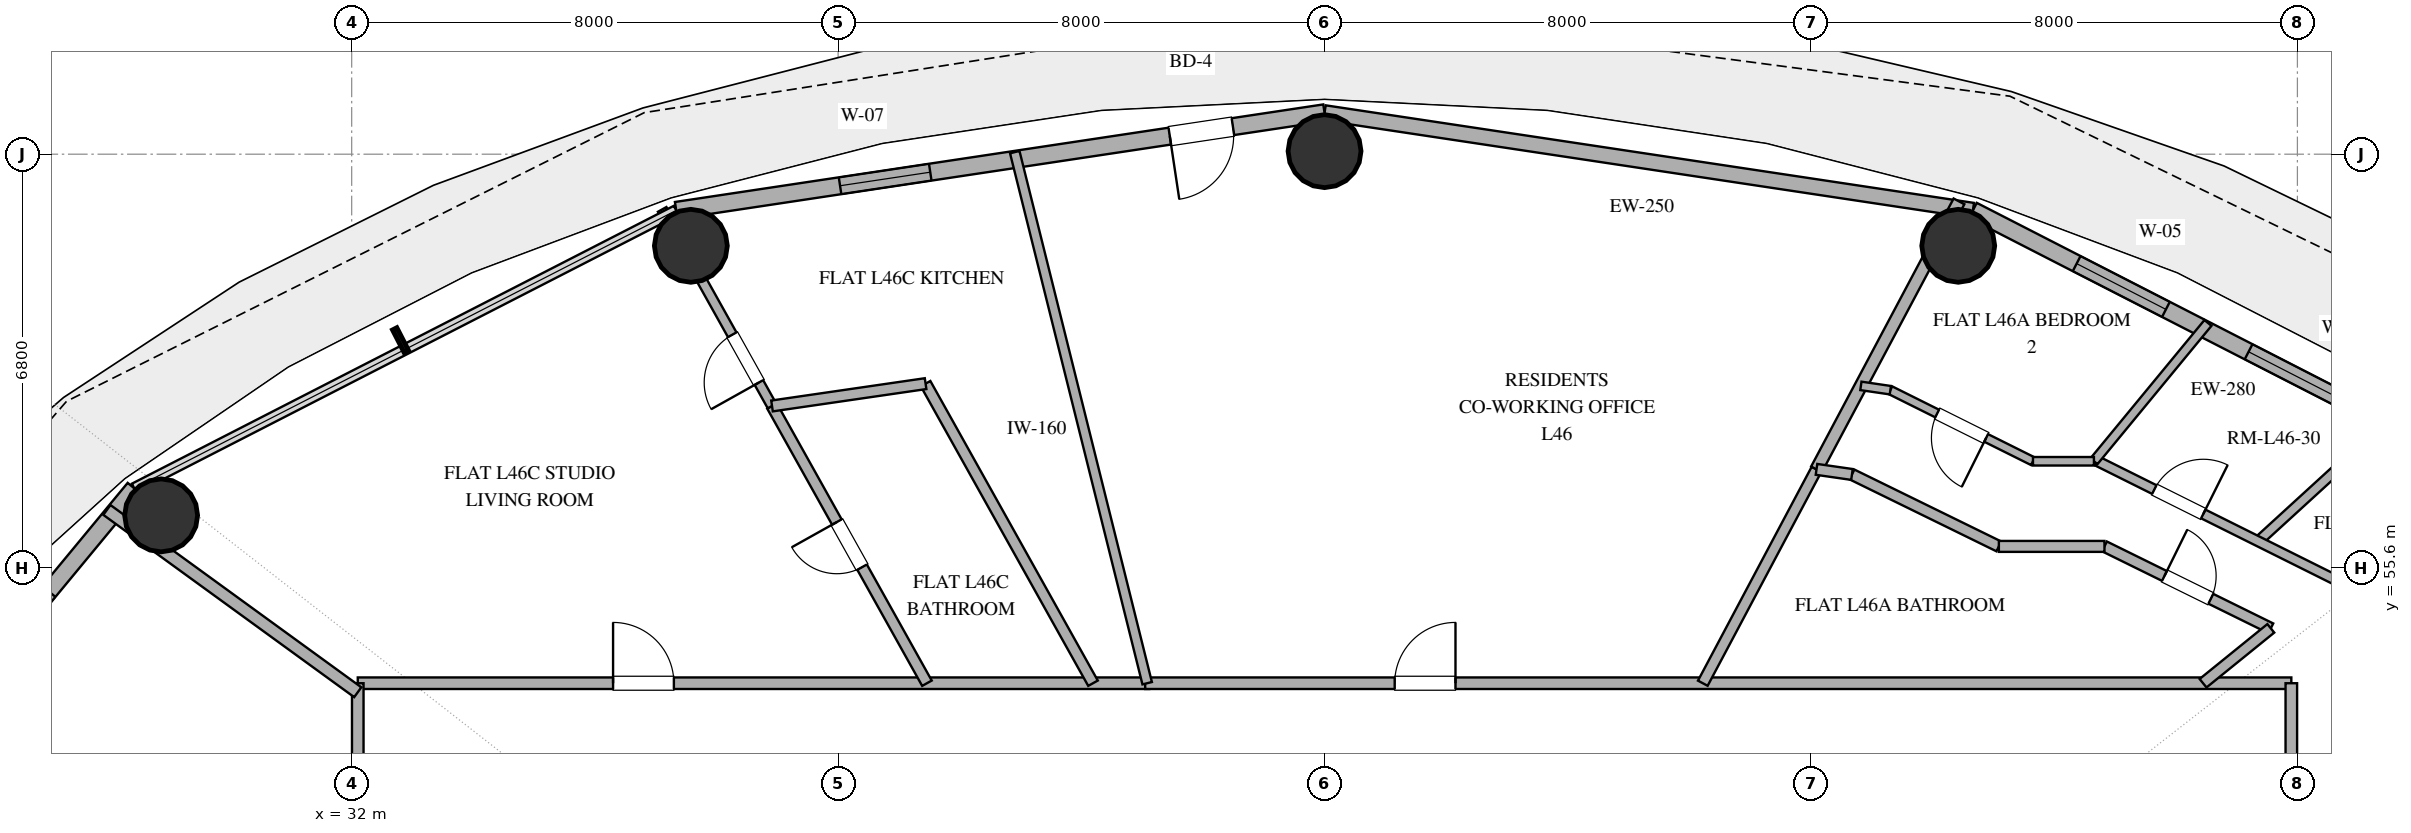
"""IFC4 building model, lengths in metres.
Left out: names, types, materials, properties, quantities, classifications, styles, units other than length and angle.
Written with IfcOpenShell. Run it as: python <this file> out.ifc"""

import sys

from ifc_helpers import new_model, si_unit, direction, frame, frame_2d, origin, origin_2d, place, context, subcontext, project, spatial, rectangle, hollow_circle, extrude, element, fill, save


model = new_model("IFC4")
c1 = context("Model", 3, precision=1e-05, world=origin(), true_north=direction((0.0, 1.0)))
c2 = subcontext(c1, "Body", "Model", "MODEL_VIEW")
j1 = project(units=[si_unit("LENGTHUNIT", "METRE"), si_unit("PLANEANGLEUNIT", "RADIAN")], contexts=[c1])
p1 = place(None, origin())
s1 = spatial("IfcSite", under=j1, at=p1, CompositionType="ELEMENT")
p2 = place(p1, origin())
s2 = spatial("IfcBuilding", under=s1, at=p2, CompositionType="ELEMENT")
p3 = place(p2, frame((0.0, 0.0, 183.0)))
s3 = spatial("IfcBuildingStorey", under=s2, at=p3, CompositionType="ELEMENT", Elevation=183.0)
for number, where, z_axis, x_axis in (
    (1, (58.422, 60.893, 0.0), (0.0, 0.0, 1.0), (1.0, 0.0, 0.0)),
    (2, (48.0, 62.45, 0.0), (0.0, 0.0, 1.0), (1.0, 0.0, 0.0)),
    (3, (37.578, 60.893, 0.0), (0.0, 0.0, 1.0), (1.0, 0.0, 0.0)),
    (4, (28.866, 56.46, 0.0), (0.0, 0.0, 1.0), (1.0, 0.0, 0.0)),
):
    element("IfcColumn", number, at=place(p3, frame(where, z_axis=z_axis, x_axis=x_axis)), inside=s3, PredefinedType="COLUMN", context=c2, shape_type="SweptSolid", body=[
        extrude(hollow_circle(Radius=0.6, WallThickness=0.032, at=origin_2d()), origin(), (0.0, 0.0, 1.0), 3.38),
    ])
p4 = place(p3, frame((67.576, 56.906, 0.0), z_axis=(0.0, 0.0, 1.0), x_axis=(-0.889872523182, 0.456209263919, 0.0)))
e5 = element("IfcWall", 5, at=p4, inside=s3, PredefinedType="SOLIDWALL", context=c2, shape_type="SweptSolid", body=[
    extrude(rectangle(XDim=10.016, YDim=0.28, at=frame_2d((5.008, 0.0))), origin(), (0.0, 0.0, 1.0), 3.38),
])
p5 = place(p4, frame((3.121, 0.0, 0.85)))
e6 = element("IfcOpeningElement", 6, at=p5, cuts=e5, PredefinedType="OPENING", context=c2, shape_type="SweptSolid", body=[
    extrude(rectangle(XDim=1.8, YDim=2.2, at=frame_2d((0.9, 1.1))), frame((0.0, 0.15, 0.0), z_axis=(0.0, -1.0, 0.0), x_axis=(1.0, 0.0, 0.0)), (0.0, 0.0, 1.0), 0.3),
])
p6 = place(p4, frame((6.448, 0.0, 0.85)))
e7 = element("IfcOpeningElement", 7, at=p6, cuts=e5, PredefinedType="OPENING", context=c2, shape_type="SweptSolid", body=[
    extrude(rectangle(XDim=1.65, YDim=2.0, at=frame_2d((0.825, 1.0))), frame((0.0, 0.15, 0.0), z_axis=(0.0, -1.0, 0.0), x_axis=(1.0, 0.0, 0.0)), (0.0, 0.0, 1.0), 0.3),
])
p7 = place(p3, frame((58.663, 61.475, 0.0), z_axis=(0.0, 0.0, 1.0), x_axis=(-0.988863993413, 0.148822049884, 0.0)))
e8 = element("IfcWall", 8, at=p7, inside=s3, PredefinedType="SOLIDWALL", context=c2, shape_type="SweptSolid", body=[
    extrude(rectangle(XDim=10.783, YDim=0.25, at=frame_2d((5.392, 0.0))), origin(), (0.0, 0.0, 1.0), 3.38),
])
p8 = place(p3, frame((48.0, 63.08, 0.0), z_axis=(0.0, 0.0, 1.0), x_axis=(-0.988863993413, -0.148822049884, 0.0)))
e9 = element("IfcWall", 9, at=p8, inside=s3, PredefinedType="SOLIDWALL", context=c2, shape_type="SweptSolid", body=[
    extrude(rectangle(XDim=10.783, YDim=0.28, at=frame_2d((5.392, 0.0))), origin(), (0.0, 0.0, 1.0), 3.38),
])
p9 = place(p8, frame((1.524, 0.0, 0.0)))
e10 = element("IfcOpeningElement", 10, at=p9, cuts=e9, PredefinedType="OPENING", context=c2, shape_type="SweptSolid", body=[
    extrude(rectangle(XDim=1.05, YDim=2.2, at=frame_2d((0.525, 1.1))), frame((0.0, 0.15, 0.0), z_axis=(0.0, -1.0, 0.0), x_axis=(1.0, 0.0, 0.0)), (0.0, 0.0, 1.0), 0.3),
])
p10 = place(p8, frame((6.558, 0.0, 0.85)))
e11 = element("IfcOpeningElement", 11, at=p10, cuts=e9, PredefinedType="OPENING", context=c2, shape_type="SweptSolid", body=[
    extrude(rectangle(XDim=1.5, YDim=1.8, at=frame_2d((0.75, 0.9))), frame((0.0, 0.15, 0.0), z_axis=(0.0, -1.0, 0.0), x_axis=(1.0, 0.0, 0.0)), (0.0, 0.0, 1.0), 0.3),
])
p11 = place(p3, frame((28.424, 56.906, 0.0), z_axis=(0.0, 0.0, 1.0), x_axis=(-0.637333477683, -0.770588111915, 0.0)))
e12 = element("IfcWall", 12, at=p11, inside=s3, PredefinedType="SOLIDWALL", context=c2, shape_type="SweptSolid", body=[
    extrude(rectangle(XDim=8.875, YDim=0.28, at=frame_2d((4.438, 0.0))), origin(), (0.0, 0.0, 1.0), 3.38),
])
p12 = place(p11, frame((2.202, 0.0, 0.85)))
e13 = element("IfcOpeningElement", 13, at=p12, cuts=e12, PredefinedType="OPENING", context=c2, shape_type="SweptSolid", body=[
    extrude(rectangle(XDim=1.35, YDim=1.8, at=frame_2d((0.675, 0.9))), frame((0.0, 0.15, 0.0), z_axis=(0.0, -1.0, 0.0), x_axis=(1.0, 0.0, 0.0)), (0.0, 0.0, 1.0), 0.3),
])
p13 = place(p11, frame((4.294, 0.0, 0.85)))
e14 = element("IfcOpeningElement", 14, at=p13, cuts=e12, PredefinedType="OPENING", context=c2, shape_type="SweptSolid", body=[
    extrude(rectangle(XDim=1.35, YDim=1.8, at=frame_2d((0.675, 0.9))), frame((0.0, 0.15, 0.0), z_axis=(0.0, -1.0, 0.0), x_axis=(1.0, 0.0, 0.0)), (0.0, 0.0, 1.0), 0.3),
])
p14 = place(p3, frame((32.1, 53.7, 0.0), z_axis=(0.0, 0.0, 1.0), x_axis=(1.0, 0.0, 0.0)))
e15 = element("IfcWall", 15, at=p14, inside=s3, PredefinedType="PARTITIONING", context=c2, shape_type="SweptSolid", body=[
    extrude(rectangle(XDim=13.016, YDim=0.19, at=frame_2d((6.508, 0.0))), origin(), (0.0, 0.0, 1.0), 2.74),
])
p15 = place(p14, frame((4.199, 0.0, 0.0)))
e16 = element("IfcOpeningElement", 16, at=p15, cuts=e15, PredefinedType="OPENING", context=c2, shape_type="SweptSolid", body=[
    extrude(rectangle(XDim=1.0, YDim=2.2, at=frame_2d((0.5, 1.1))), frame((0.0, 0.105, 0.0), z_axis=(0.0, -1.0, 0.0), x_axis=(1.0, 0.0, 0.0)), (0.0, 0.0, 1.0), 0.21),
])
p16 = place(p3, frame((45.05, 53.7, 0.0), z_axis=(0.0, 0.0, 1.0), x_axis=(1.0, 0.0, 0.0)))
e17 = element("IfcWall", 17, at=p16, inside=s3, PredefinedType="PARTITIONING", context=c2, shape_type="SweptSolid", body=[
    extrude(rectangle(XDim=18.85, YDim=0.19, at=frame_2d((9.425, 0.0))), origin(), (0.0, 0.0, 1.0), 2.74),
])
p17 = place(p16, frame((4.104, 0.0, 0.0)))
e18 = element("IfcOpeningElement", 18, at=p17, cuts=e17, PredefinedType="OPENING", context=c2, shape_type="SweptSolid", body=[
    extrude(rectangle(XDim=1.0, YDim=2.2, at=frame_2d((0.5, 1.1))), frame((0.0, 0.105, 0.0), z_axis=(0.0, -1.0, 0.0), x_axis=(1.0, 0.0, 0.0)), (0.0, 0.0, 1.0), 0.21),
])
p18 = place(p3, frame((45.083, 53.7, 0.0), z_axis=(0.0, 0.0, 1.0), x_axis=(-0.241929318505, 0.970293875508, 0.0)))
e19 = element("IfcWall", 19, at=p18, inside=s3, PredefinedType="PLUMBINGWALL", context=c2, shape_type="SweptSolid", body=[
    extrude(rectangle(XDim=9.001, YDim=0.16, at=frame_2d((4.501, 0.0))), origin(), (0.0, 0.0, 1.0), 2.74),
])
p19 = place(p3, frame((32.1, 42.765, 0.0), z_axis=(0.0, 0.0, 1.0), x_axis=(0.0, 1.0, 0.0)))
e20 = element("IfcWall", 20, at=p19, inside=s3, PredefinedType="PARTITIONING", context=c2, shape_type="SweptSolid", body=[
    extrude(rectangle(XDim=10.935, YDim=0.19, at=frame_2d((5.467, 0.0))), origin(), (0.0, 0.0, 1.0), 2.74),
])
p20 = place(p19, frame((6.06, 0.0, 0.0)))
e21 = element("IfcOpeningElement", 21, at=p20, cuts=e20, PredefinedType="OPENING", context=c2, shape_type="SweptSolid", body=[
    extrude(rectangle(XDim=1.0, YDim=2.2, at=frame_2d((0.5, 1.1))), frame((0.0, 0.105, 0.0), z_axis=(0.0, -1.0, 0.0), x_axis=(1.0, 0.0, 0.0)), (0.0, 0.0, 1.0), 0.21),
])
p21 = place(p3, frame((63.9, 53.7, 0.0), z_axis=(0.0, 0.0, 1.0), x_axis=(0.0, -1.0, 0.0)))
e22 = element("IfcWall", 22, at=p21, inside=s3, PredefinedType="PARTITIONING", context=c2, shape_type="SweptSolid", body=[
    extrude(rectangle(XDim=16.292, YDim=0.19, at=frame_2d((8.146, 0.0))), origin(), (0.0, 0.0, 1.0), 2.74),
])
p22 = place(p21, frame((3.087, 0.0, 0.0)))
e23 = element("IfcOpeningElement", 23, at=p22, cuts=e22, PredefinedType="OPENING", context=c2, shape_type="SweptSolid", body=[
    extrude(rectangle(XDim=1.0, YDim=2.2, at=frame_2d((0.5, 1.1))), frame((0.0, 0.105, 0.0), z_axis=(0.0, -1.0, 0.0), x_axis=(1.0, 0.0, 0.0)), (0.0, 0.0, 1.0), 0.21),
])
p23 = place(p3, frame((41.439, 58.627, 0.0), z_axis=(0.0, 0.0, 1.0), x_axis=(0.487819418615, -0.872944565721, 0.0)))
e24 = element("IfcWall", 24, at=p23, inside=s3, PredefinedType="PLUMBINGWALL", context=c2, shape_type="SweptSolid", body=[
    extrude(rectangle(XDim=5.644, YDim=0.18, at=frame_2d((2.822, 0.0))), origin(), (0.0, 0.0, 1.0), 2.74),
])
p24 = place(p3, frame((41.461, 53.7, 0.0), z_axis=(0.0, 0.0, 1.0), x_axis=(-0.487871640049, 0.872915381257, 0.0)))
e25 = element("IfcWall", 25, at=p24, inside=s3, PredefinedType="PLUMBINGWALL", context=c2, shape_type="SweptSolid", body=[
    extrude(rectangle(XDim=5.223, YDim=0.18, at=frame_2d((2.612, 0.0))), origin(), (0.0, 0.0, 1.0), 2.74),
])
p25 = place(p24, frame((2.187, 0.0, 0.0)))
e26 = element("IfcOpeningElement", 26, at=p25, cuts=e25, PredefinedType="OPENING", context=c2, shape_type="SweptSolid", body=[
    extrude(rectangle(XDim=0.85, YDim=2.1, at=frame_2d((0.425, 1.05))), frame((0.0, 0.1, 0.0), z_axis=(0.0, -1.0, 0.0), x_axis=(1.0, 0.0, 0.0)), (0.0, 0.0, 1.0), 0.2),
])
p26 = place(p3, frame((32.1, 53.552, 0.0), z_axis=(0.0, 0.0, 1.0), x_axis=(-0.809023715391, 0.587776001496, 0.0)))
e27 = element("IfcWall", 27, at=p26, inside=s3, PredefinedType="PARTITIONING", context=c2, shape_type="SweptSolid", body=[
    extrude(rectangle(XDim=5.1, YDim=0.2, at=frame_2d((2.55, 0.0))), origin(), (0.0, 0.0, 1.0), 2.74),
])
p27 = place(p3, frame((54.221, 53.7, 0.0), z_axis=(0.0, 0.0, 1.0), x_axis=(0.469480828888, 0.882942665922, 0.0)))
e28 = element("IfcWall", 28, at=p27, inside=s3, PredefinedType="PLUMBINGWALL", context=c2, shape_type="SweptSolid", body=[
    extrude(rectangle(XDim=3.983, YDim=0.18, at=frame_2d((1.992, 0.0))), origin(), (0.0, 0.0, 1.0), 2.74),
])
p28 = place(p3, frame((38.913, 58.26, 0.0), z_axis=(0.0, 0.0, 1.0), x_axis=(-0.487830223896, 0.87293852742, 0.0)))
e29 = element("IfcWall", 29, at=p28, inside=s3, PredefinedType="PLUMBINGWALL", context=c2, shape_type="SweptSolid", body=[
    extrude(rectangle(XDim=3.703, YDim=0.16, at=frame_2d((1.852, 0.0))), origin(), (0.0, 0.0, 1.0), 2.74),
])
p29 = place(p28, frame((0.441, 0.0, 0.0)))
e30 = element("IfcOpeningElement", 30, at=p29, cuts=e29, PredefinedType="OPENING", context=c2, shape_type="SweptSolid", body=[
    extrude(rectangle(XDim=0.9, YDim=2.1, at=frame_2d((0.45, 1.05))), frame((0.0, 0.09, 0.0), z_axis=(0.0, -1.0, 0.0), x_axis=(1.0, 0.0, 0.0)), (0.0, 0.0, 1.0), 0.18),
])
p30 = place(p3, frame((56.091, 57.217, 0.0), z_axis=(0.0, 0.0, 1.0), x_axis=(0.469455598571, 0.882956080997, 0.0)))
e31 = element("IfcWall", 31, at=p30, inside=s3, PredefinedType="PARTITIONING", context=c2, shape_type="SweptSolid", body=[
    extrude(rectangle(XDim=4.991, YDim=0.2, at=frame_2d((2.496, 0.0))), origin(), (0.0, 0.0, 1.0), 2.74),
])
p31 = place(p3, frame((60.827, 55.95, 0.0), z_axis=(0.0, 0.0, 1.0), x_axis=(0.897069141595, -0.441890207175, 0.0)))
e32 = element("IfcWall", 32, at=p31, inside=s3, PredefinedType="PLUMBINGWALL", context=c2, shape_type="SweptSolid", body=[
    extrude(rectangle(XDim=3.05, YDim=0.18, at=frame_2d((1.525, 0.0))), origin(), (0.0, 0.0, 1.0), 2.74),
])
p32 = place(p31, frame((1.1, 0.0, 0.0)))
e33 = element("IfcOpeningElement", 33, at=p32, cuts=e32, PredefinedType="OPENING", context=c2, shape_type="SweptSolid", body=[
    extrude(rectangle(XDim=0.85, YDim=2.1, at=frame_2d((0.425, 1.05))), frame((0.0, 0.1, 0.0), z_axis=(0.0, -1.0, 0.0), x_axis=(1.0, 0.0, 0.0)), (0.0, 0.0, 1.0), 0.2),
])
p33 = place(p3, frame((63.354, 56.033, 0.0), z_axis=(0.0, 0.0, 1.0), x_axis=(0.738168713693, 0.674616150211, 0.0)))
e34 = element("IfcWall", 34, at=p33, inside=s3, PredefinedType="PLUMBINGWALL", context=c2, shape_type="SweptSolid", body=[
    extrude(rectangle(XDim=3.004, YDim=0.16, at=frame_2d((1.502, 0.0))), origin(), (0.0, 0.0, 1.0), 2.74),
])
p34 = place(p3, frame((60.713, 57.35, 0.0), z_axis=(0.0, 0.0, 1.0), x_axis=(0.894937323042, -0.44619187333, 0.0)))
e35 = element("IfcWall", 35, at=p34, inside=s3, PredefinedType="PLUMBINGWALL", context=c2, shape_type="SweptSolid", body=[
    extrude(rectangle(XDim=5.354, YDim=0.16, at=frame_2d((2.677, 0.0))), origin(), (0.0, 0.0, 1.0), 2.74),
])
p35 = place(p34, frame((1.043, 0.0, 0.0)))
e36 = element("IfcOpeningElement", 36, at=p35, cuts=e35, PredefinedType="OPENING", context=c2, shape_type="SweptSolid", body=[
    extrude(rectangle(XDim=0.9, YDim=2.1, at=frame_2d((0.45, 1.05))), frame((0.0, 0.09, 0.0), z_axis=(0.0, -1.0, 0.0), x_axis=(1.0, 0.0, 0.0)), (0.0, 0.0, 1.0), 0.18),
])
p36 = place(p3, frame((62.529, 59.625, 0.0), z_axis=(0.0, 0.0, 1.0), x_axis=(-0.63607001361, -0.771631348369, 0.0)))
e37 = element("IfcWall", 37, at=p36, inside=s3, PredefinedType="PARTITIONING", context=c2, shape_type="SweptSolid", body=[
    extrude(rectangle(XDim=2.948, YDim=0.15, at=frame_2d((1.474, 0.0))), origin(), (0.0, 0.0, 1.0), 2.74),
])
p37 = place(p3, frame((56.674, 57.133, 0.0), z_axis=(0.0, 0.0, 1.0), x_axis=(0.898063439596, -0.439865955105, 0.0)))
e38 = element("IfcWall", 38, at=p37, inside=s3, PredefinedType="PLUMBINGWALL", context=c2, shape_type="SweptSolid", body=[
    extrude(rectangle(XDim=2.69, YDim=0.18, at=frame_2d((1.345, 0.0))), origin(), (0.0, 0.0, 1.0), 2.74),
])
p38 = place(p3, frame((59.651, 57.35, 0.0), z_axis=(0.0, 0.0, 1.0), x_axis=(-0.895041110332, 0.445983644112, 0.0)))
e39 = element("IfcWall", 39, at=p38, inside=s3, PredefinedType="PARTITIONING", context=c2, shape_type="SweptSolid", body=[
    extrude(rectangle(XDim=2.621, YDim=0.14, at=frame_2d((1.311, 0.0))), origin(), (0.0, 0.0, 1.0), 2.74),
])
p39 = place(p38, frame((0.861, 0.0, 0.0)))
e40 = element("IfcOpeningElement", 40, at=p39, cuts=e39, PredefinedType="OPENING", context=c2, shape_type="SweptSolid", body=[
    extrude(rectangle(XDim=0.9, YDim=2.1, at=frame_2d((0.45, 1.05))), frame((0.0, 0.08, 0.0), z_axis=(0.0, -1.0, 0.0), x_axis=(1.0, 0.0, 0.0)), (0.0, 0.0, 1.0), 0.16),
])
p40 = place(p3, frame((38.913, 58.26, 0.0), z_axis=(0.0, 0.0, 1.0), x_axis=(0.989598326399, 0.143858098096, 0.0)))
e41 = element("IfcWall", 41, at=p40, inside=s3, PredefinedType="PLUMBINGWALL", context=c2, shape_type="SweptSolid", body=[
    extrude(rectangle(XDim=2.552, YDim=0.18, at=frame_2d((1.276, 0.0))), origin(), (0.0, 0.0, 1.0), 2.74),
])
p41 = place(p3, frame((59.09, 55.95, 0.0), z_axis=(0.0, 0.0, 1.0), x_axis=(1.0, 0.0, 0.0)))
e42 = element("IfcWall", 42, at=p41, inside=s3, PredefinedType="PLUMBINGWALL", context=c2, shape_type="SweptSolid", body=[
    extrude(rectangle(XDim=1.737, YDim=0.18, at=frame_2d((0.868, 0.0))), origin(), (0.0, 0.0, 1.0), 2.74),
])
p42 = place(p3, frame((63.563, 54.602, 0.0), z_axis=(0.0, 0.0, 1.0), x_axis=(-0.777201256293, -0.62925210148, 0.0)))
e43 = element("IfcWall", 43, at=p42, inside=s3, PredefinedType="PLUMBINGWALL", context=c2, shape_type="SweptSolid", body=[
    extrude(rectangle(XDim=1.434, YDim=0.18, at=frame_2d((0.717, 0.0))), origin(), (0.0, 0.0, 1.0), 2.74),
])
p43 = place(p3, frame((60.654, 57.35, 0.0), z_axis=(0.0, 0.0, 1.0), x_axis=(-1.0, 0.0, 0.0)))
e44 = element("IfcWall", 44, at=p43, inside=s3, PredefinedType="PARTITIONING", context=c2, shape_type="SweptSolid", body=[
    extrude(rectangle(XDim=1.002, YDim=0.14, at=frame_2d((0.501, 0.0))), origin(), (0.0, 0.0, 1.0), 2.74),
])
p44 = place(p3, frame((56.091, 57.217, 0.0), z_axis=(0.0, 0.0, 1.0), x_axis=(0.989841434531, -0.142175716936, 0.0)))
e45 = element("IfcWall", 45, at=p44, inside=s3, PredefinedType="PLUMBINGWALL", context=c2, shape_type="SweptSolid", body=[
    extrude(rectangle(XDim=0.589, YDim=0.18, at=frame_2d((0.294, 0.0))), origin(), (0.0, 0.0, 1.0), 2.74),
])
p45 = place(p3, frame((57.305, 58.519, 0.0), z_axis=(0.0, 0.0, 1.0), x_axis=(-0.989485449351, 0.144632449754, 0.0)))
e46 = element("IfcWall", 46, at=p45, inside=s3, PredefinedType="PARTITIONING", context=c2, shape_type="SweptSolid", body=[
    extrude(rectangle(XDim=0.49, YDim=0.14, at=frame_2d((0.245, 0.0))), origin(), (0.0, 0.0, 1.0), 2.74),
])
p46 = place(p5, origin())
e47 = element("IfcWindow", 47, at=p46, inside=s3, PartitioningType="SINGLE_PANEL", PredefinedType="WINDOW", context=c2, shape_type="SweptSolid", body=[
    extrude(rectangle(XDim=1.8, YDim=2.2, at=frame_2d((0.9, 1.1))), frame((0.0, 0.03, 0.0), z_axis=(0.0, -1.0, 0.0), x_axis=(1.0, 0.0, 0.0)), (0.0, 0.0, 1.0), 0.06),
])
fill(e6, e47)
p47 = place(p6, origin())
e48 = element("IfcWindow", 48, at=p47, inside=s3, PartitioningType="SINGLE_PANEL", PredefinedType="WINDOW", context=c2, shape_type="SweptSolid", body=[
    extrude(rectangle(XDim=1.65, YDim=2.0, at=frame_2d((0.825, 1.0))), frame((0.0, 0.03, 0.0), z_axis=(0.0, -1.0, 0.0), x_axis=(1.0, 0.0, 0.0)), (0.0, 0.0, 1.0), 0.06),
])
fill(e7, e48)
p48 = place(p9, origin())
e49 = element("IfcDoor", 49, at=p48, inside=s3, OperationType="SINGLE_SWING_RIGHT", PredefinedType="DOOR", context=c2, shape_type="SweptSolid", body=[
    extrude(rectangle(XDim=1.05, YDim=2.2, at=frame_2d((0.525, 1.1))), frame((0.0, 0.025, 0.0), z_axis=(0.0, -1.0, 0.0), x_axis=(1.0, 0.0, 0.0)), (0.0, 0.0, 1.0), 0.05),
])
fill(e10, e49)
p49 = place(p10, origin())
e50 = element("IfcWindow", 50, at=p49, inside=s3, PartitioningType="SINGLE_PANEL", PredefinedType="WINDOW", context=c2, shape_type="SweptSolid", body=[
    extrude(rectangle(XDim=1.5, YDim=1.8, at=frame_2d((0.75, 0.9))), frame((0.0, 0.03, 0.0), z_axis=(0.0, -1.0, 0.0), x_axis=(1.0, 0.0, 0.0)), (0.0, 0.0, 1.0), 0.06),
])
fill(e11, e50)
p50 = place(p15, origin())
e51 = element("IfcDoor", 51, at=p50, inside=s3, OperationType="SINGLE_SWING_LEFT", PredefinedType="DOOR", context=c2, shape_type="SweptSolid", body=[
    extrude(rectangle(XDim=1.0, YDim=2.2, at=frame_2d((0.5, 1.1))), frame((0.0, 0.025, 0.0), z_axis=(0.0, -1.0, 0.0), x_axis=(1.0, 0.0, 0.0)), (0.0, 0.0, 1.0), 0.05),
])
fill(e16, e51)
p51 = place(p17, origin())
e52 = element("IfcDoor", 52, at=p51, inside=s3, OperationType="SINGLE_SWING_RIGHT", PredefinedType="DOOR", context=c2, shape_type="SweptSolid", body=[
    extrude(rectangle(XDim=1.0, YDim=2.2, at=frame_2d((0.5, 1.1))), frame((0.0, 0.025, 0.0), z_axis=(0.0, -1.0, 0.0), x_axis=(1.0, 0.0, 0.0)), (0.0, 0.0, 1.0), 0.05),
])
fill(e18, e52)
p52 = place(p25, origin())
e53 = element("IfcDoor", 53, at=p52, inside=s3, OperationType="SINGLE_SWING_RIGHT", PredefinedType="DOOR", context=c2, shape_type="SweptSolid", body=[
    extrude(rectangle(XDim=0.85, YDim=2.1, at=frame_2d((0.425, 1.05))), frame((0.0, 0.025, 0.0), z_axis=(0.0, -1.0, 0.0), x_axis=(1.0, 0.0, 0.0)), (0.0, 0.0, 1.0), 0.05),
])
fill(e26, e53)
p53 = place(p29, origin())
e54 = element("IfcDoor", 54, at=p53, inside=s3, OperationType="SINGLE_SWING_LEFT", PredefinedType="DOOR", context=c2, shape_type="SweptSolid", body=[
    extrude(rectangle(XDim=0.9, YDim=2.1, at=frame_2d((0.45, 1.05))), frame((0.0, 0.025, 0.0), z_axis=(0.0, -1.0, 0.0), x_axis=(1.0, 0.0, 0.0)), (0.0, 0.0, 1.0), 0.05),
])
fill(e30, e54)
p54 = place(p32, origin())
e55 = element("IfcDoor", 55, at=p54, inside=s3, OperationType="SINGLE_SWING_LEFT", PredefinedType="DOOR", context=c2, shape_type="SweptSolid", body=[
    extrude(rectangle(XDim=0.85, YDim=2.1, at=frame_2d((0.425, 1.05))), frame((0.0, 0.025, 0.0), z_axis=(0.0, -1.0, 0.0), x_axis=(1.0, 0.0, 0.0)), (0.0, 0.0, 1.0), 0.05),
])
fill(e33, e55)
p55 = place(p35, origin())
e56 = element("IfcDoor", 56, at=p55, inside=s3, OperationType="SINGLE_SWING_RIGHT", PredefinedType="DOOR", context=c2, shape_type="SweptSolid", body=[
    extrude(rectangle(XDim=0.9, YDim=2.1, at=frame_2d((0.45, 1.05))), frame((0.0, 0.025, 0.0), z_axis=(0.0, -1.0, 0.0), x_axis=(1.0, 0.0, 0.0)), (0.0, 0.0, 1.0), 0.05),
])
fill(e36, e56)
p56 = place(p39, origin())
e57 = element("IfcDoor", 57, at=p56, inside=s3, OperationType="SINGLE_SWING_LEFT", PredefinedType="DOOR", context=c2, shape_type="SweptSolid", body=[
    extrude(rectangle(XDim=0.9, YDim=2.1, at=frame_2d((0.45, 1.05))), frame((0.0, 0.025, 0.0), z_axis=(0.0, -1.0, 0.0), x_axis=(1.0, 0.0, 0.0)), (0.0, 0.0, 1.0), 0.05),
])
fill(e40, e57)
save(model, sys.argv[1])
